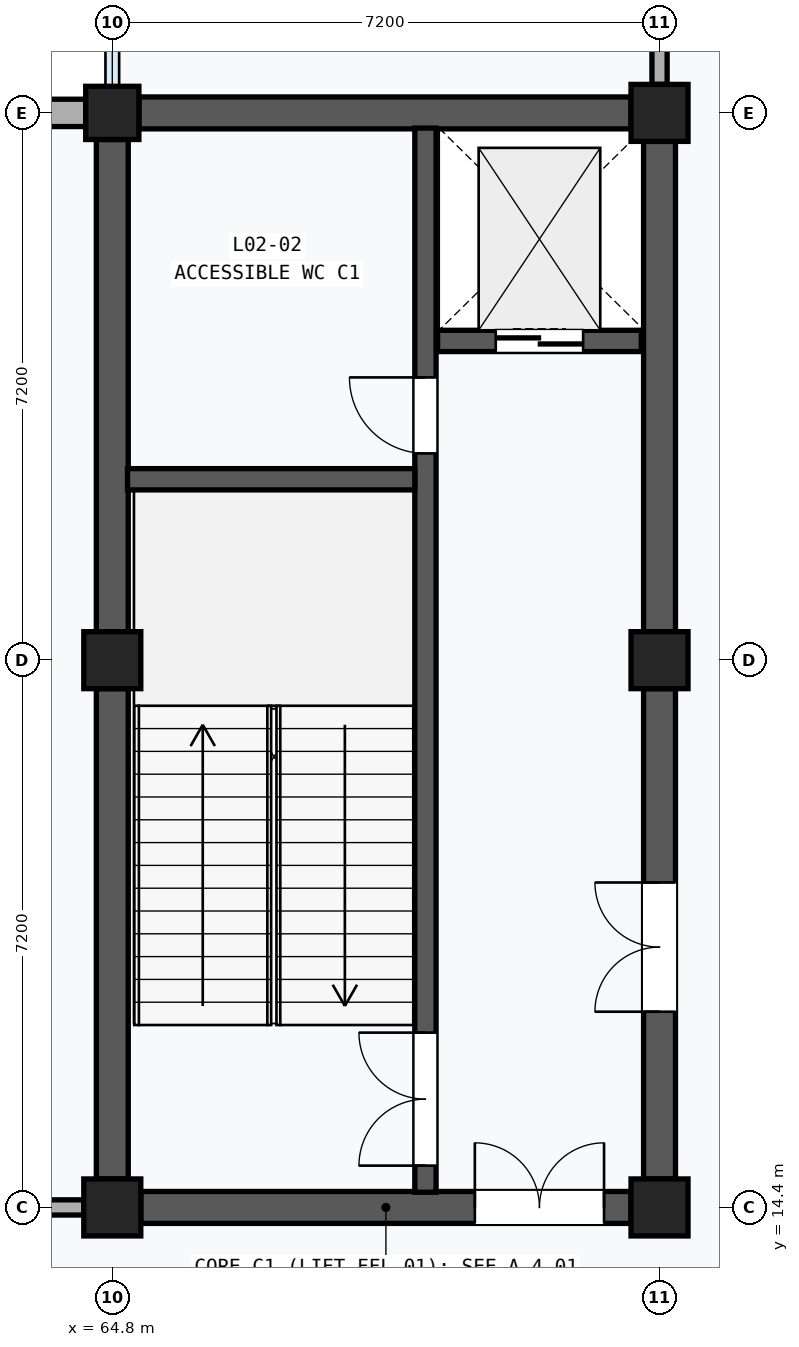
"""IFC4 building model, lengths in metres.
Left out: names, types, materials, properties, quantities, classifications, styles, units other than length and angle.
Written with IfcOpenShell. Run it as: python <this file> out.ifc"""

import sys

from ifc_helpers import new_model, si_unit, direction, frame, frame_2d, origin, origin_2d, place, context, subcontext, project, spatial, rectangle, extrude, element, fill, save


model = new_model("IFC4")
c1 = context("Model", 3, precision=1e-05, world=origin(), true_north=direction((0.0, 1.0)))
c2 = subcontext(c1, "Body", "Model", "MODEL_VIEW")
j1 = project(units=[si_unit("LENGTHUNIT", "METRE"), si_unit("PLANEANGLEUNIT", "RADIAN")], contexts=[c1])
p1 = place(None, origin())
s1 = spatial("IfcSite", under=j1, at=p1, CompositionType="ELEMENT")
p2 = place(p1, origin())
s2 = spatial("IfcBuilding", under=s1, at=p2, CompositionType="ELEMENT")
p3 = place(p2, frame((0.0, 0.0, 9.6)))
s3 = spatial("IfcBuildingStorey", under=s2, at=p3, CompositionType="ELEMENT", Elevation=9.6)
for number, where, z_axis, x_axis in (
    (1, (64.8, 14.4, 0.0), (0.0, 0.0, 1.0), (1.0, 0.0, 0.0)),
    (2, (64.8, 21.6, 0.0), (0.0, 0.0, 1.0), (1.0, 0.0, 0.0)),
):
    element("IfcColumn", number, at=place(p3, frame(where, z_axis=z_axis, x_axis=x_axis)), inside=s3, PredefinedType="COLUMN", context=c2, shape_type="SweptSolid", body=[
        extrude(rectangle(XDim=0.75, YDim=0.75, at=origin_2d()), origin(), (0.0, 0.0, 1.0), 4.8),
    ])
p4 = place(p3, frame((64.8, 28.8, 0.0), z_axis=(0.0, 0.0, 1.0), x_axis=(1.0, 0.0, 0.0)))
e3 = element("IfcColumn", 3, at=p4, inside=s3, PredefinedType="COLUMN", context=c2, shape_type="SweptSolid", body=[
    extrude(rectangle(XDim=0.7, YDim=0.7, at=origin_2d()), origin(), (0.0, 0.0, 1.0), 4.8),
])
for number, where, z_axis, x_axis in (
    (4, (72.0, 14.4, 0.0), (0.0, 0.0, 1.0), (1.0, 0.0, 0.0)),
    (5, (72.0, 21.6, 0.0), (0.0, 0.0, 1.0), (1.0, 0.0, 0.0)),
    (6, (72.0, 28.8, 0.0), (0.0, 0.0, 1.0), (1.0, 0.0, 0.0)),
):
    element("IfcColumn", number, at=place(p3, frame(where, z_axis=z_axis, x_axis=x_axis)), inside=s3, PredefinedType="COLUMN", context=c2, shape_type="SweptSolid", body=[
        extrude(rectangle(XDim=0.75, YDim=0.75, at=origin_2d()), origin(), (0.0, 0.0, 1.0), 4.8),
    ])
p5 = place(p3, frame((57.95, 28.8, 0.0), z_axis=(0.0, 0.0, 1.0), x_axis=(1.0, 0.0, 0.0)))
e7 = element("IfcWall", 7, at=p5, inside=s3, PredefinedType="SOLIDWALL", context=c2, shape_type="SweptSolid", body=[
    extrude(rectangle(XDim=6.5, YDim=0.36, at=frame_2d((3.25, 0.0))), origin(), (0.0, 0.0, 1.0), 3.88),
])
p6 = place(p5, frame((2.25, 0.0, 0.7)))
e8 = element("IfcOpeningElement", 8, at=p6, cuts=e7, PredefinedType="OPENING", context=c2, shape_type="SweptSolid", body=[
    extrude(rectangle(XDim=2.0, YDim=2.2, at=frame_2d((1.0, 1.1))), frame((0.0, 0.192, 0.0), z_axis=(0.0, -1.0, 0.0), x_axis=(1.0, 0.0, 0.0)), (0.0, 0.0, 1.0), 0.384),
])
p7 = place(p3, frame((64.8, 14.775, 0.0), z_axis=(0.0, 0.0, 1.0), x_axis=(0.0, 1.0, 0.0)))
e9 = element("IfcWall", 9, at=p7, inside=s3, PredefinedType="SHEAR", context=c2, shape_type="SweptSolid", body=[
    extrude(rectangle(XDim=6.45, YDim=0.42, at=frame_2d((3.225, 0.0))), origin(), (0.0, 0.0, 1.0), 3.74),
])
p8 = place(p3, frame((64.8, 21.975, 0.0), z_axis=(0.0, 0.0, 1.0), x_axis=(0.0, 1.0, 0.0)))
e10 = element("IfcWall", 10, at=p8, inside=s3, PredefinedType="SHEAR", context=c2, shape_type="SweptSolid", body=[
    extrude(rectangle(XDim=6.475, YDim=0.42, at=frame_2d((3.237, 0.0))), origin(), (0.0, 0.0, 1.0), 3.74),
])
p9 = place(p3, frame((72.0, 14.775, 0.0), z_axis=(0.0, 0.0, 1.0), x_axis=(0.0, 1.0, 0.0)))
e11 = element("IfcWall", 11, at=p9, inside=s3, PredefinedType="SHEAR", context=c2, shape_type="SweptSolid", body=[
    extrude(rectangle(XDim=6.45, YDim=0.42, at=frame_2d((3.225, 0.0))), origin(), (0.0, 0.0, 1.0), 3.74),
])
p10 = place(p9, frame((2.2, 0.0, 0.0)))
e12 = element("IfcOpeningElement", 12, at=p10, cuts=e11, PredefinedType="OPENING", context=c2, shape_type="SweptSolid", body=[
    extrude(rectangle(XDim=1.7, YDim=2.25, at=frame_2d((0.85, 1.125))), frame((0.0, 0.222, 0.0), z_axis=(0.0, -1.0, 0.0), x_axis=(1.0, 0.0, 0.0)), (0.0, 0.0, 1.0), 0.444),
])
p11 = place(p3, frame((72.0, 21.975, 0.0), z_axis=(0.0, 0.0, 1.0), x_axis=(0.0, 1.0, 0.0)))
e13 = element("IfcWall", 13, at=p11, inside=s3, PredefinedType="SHEAR", context=c2, shape_type="SweptSolid", body=[
    extrude(rectangle(XDim=6.45, YDim=0.42, at=frame_2d((3.225, 0.0))), origin(), (0.0, 0.0, 1.0), 3.74),
])
p12 = place(p3, frame((65.175, 14.4, 0.0), z_axis=(0.0, 0.0, 1.0), x_axis=(1.0, 0.0, 0.0)))
e14 = element("IfcWall", 14, at=p12, inside=s3, PredefinedType="SHEAR", context=c2, shape_type="SweptSolid", body=[
    extrude(rectangle(XDim=6.45, YDim=0.42, at=frame_2d((3.225, 0.0))), origin(), (0.0, 0.0, 1.0), 3.74),
])
p13 = place(p12, frame((4.395, 0.0, 0.0)))
e15 = element("IfcOpeningElement", 15, at=p13, cuts=e14, PredefinedType="OPENING", context=c2, shape_type="SweptSolid", body=[
    extrude(rectangle(XDim=1.7, YDim=2.25, at=frame_2d((0.85, 1.125))), frame((0.0, 0.222, 0.0), z_axis=(0.0, -1.0, 0.0), x_axis=(1.0, 0.0, 0.0)), (0.0, 0.0, 1.0), 0.444),
])
p14 = place(p3, frame((65.15, 28.8, 0.0), z_axis=(0.0, 0.0, 1.0), x_axis=(1.0, 0.0, 0.0)))
e16 = element("IfcWall", 16, at=p14, inside=s3, PredefinedType="SHEAR", context=c2, shape_type="SweptSolid", body=[
    extrude(rectangle(XDim=6.475, YDim=0.42, at=frame_2d((3.238, 0.0))), origin(), (0.0, 0.0, 1.0), 3.74),
])
p15 = place(p3, frame((68.92, 14.6, 0.0), z_axis=(0.0, 0.0, 1.0), x_axis=(0.0, 1.0, 0.0)))
e17 = element("IfcWall", 17, at=p15, inside=s3, PredefinedType="SHEAR", context=c2, shape_type="SweptSolid", body=[
    extrude(rectangle(XDim=14.0, YDim=0.28, at=frame_2d((7.0, 0.0))), origin(), (0.0, 0.0, 1.0), 4.51),
])
p16 = place(p15, frame((0.35, 0.0, 0.0)))
e18 = element("IfcOpeningElement", 18, at=p16, cuts=e17, PredefinedType="OPENING", context=c2, shape_type="SweptSolid", body=[
    extrude(rectangle(XDim=1.75, YDim=2.15, at=frame_2d((0.875, 1.075))), frame((0.0, 0.152, 0.0), z_axis=(0.0, -1.0, 0.0), x_axis=(1.0, 0.0, 0.0)), (0.0, 0.0, 1.0), 0.304),
])
p17 = place(p15, frame((9.72, 0.0, 0.0)))
e19 = element("IfcOpeningElement", 19, at=p17, cuts=e17, PredefinedType="OPENING", context=c2, shape_type="SweptSolid", body=[
    extrude(rectangle(XDim=1.0, YDim=2.15, at=frame_2d((0.5, 1.075))), frame((0.0, 0.152, 0.0), z_axis=(0.0, -1.0, 0.0), x_axis=(1.0, 0.0, 0.0)), (0.0, 0.0, 1.0), 0.304),
])
p18 = place(p3, frame((65.0, 23.98, 0.0), z_axis=(0.0, 0.0, 1.0), x_axis=(1.0, 0.0, 0.0)))
e20 = element("IfcWall", 20, at=p18, inside=s3, PredefinedType="SHEAR", context=c2, shape_type="SweptSolid", body=[
    extrude(rectangle(XDim=3.78, YDim=0.28, at=frame_2d((1.89, 0.0))), origin(), (0.0, 0.0, 1.0), 4.51),
])
p19 = place(p3, frame((69.08, 25.8, 0.0), z_axis=(0.0, 0.0, 1.0), x_axis=(1.0, 0.0, 0.0)))
e21 = element("IfcWall", 21, at=p19, inside=s3, PredefinedType="SHEAR", context=c2, shape_type="SweptSolid", body=[
    extrude(rectangle(XDim=2.68, YDim=0.28, at=frame_2d((1.34, 0.0))), origin(), (0.0, 0.0, 1.0), 4.51),
])
p20 = place(p19, frame((0.765, 0.0, 0.0)))
e22 = element("IfcOpeningElement", 22, at=p20, cuts=e21, PredefinedType="OPENING", context=c2, shape_type="SweptSolid", body=[
    extrude(rectangle(XDim=1.15, YDim=2.2, at=frame_2d((0.575, 1.1))), frame((0.0, 0.152, 0.0), z_axis=(0.0, -1.0, 0.0), x_axis=(1.0, 0.0, 0.0)), (0.0, 0.0, 1.0), 0.304),
])
p21 = place(p3, frame((57.975, 14.4, 0.0), z_axis=(0.0, 0.0, 1.0), x_axis=(1.0, 0.0, 0.0)))
e23 = element("IfcWall", 23, at=p21, inside=s3, PredefinedType="PARTITIONING", context=c2, shape_type="SweptSolid", body=[
    extrude(rectangle(XDim=6.45, YDim=0.2, at=frame_2d((3.225, 0.0))), origin(), (0.0, 0.0, 1.0), 3.74),
])
p22 = place(p21, frame((2.705, 0.0, 0.0)))
e24 = element("IfcOpeningElement", 24, at=p22, cuts=e23, PredefinedType="OPENING", context=c2, shape_type="SweptSolid", body=[
    extrude(rectangle(XDim=1.04, YDim=2.14, at=frame_2d((0.52, 1.07))), frame((0.0, 0.112, 0.0), z_axis=(0.0, -1.0, 0.0), x_axis=(1.0, 0.0, 0.0)), (0.0, 0.0, 1.0), 0.224),
])
p23 = place(p3, frame((72.0, 29.175, 0.0), z_axis=(0.0, 0.0, 1.0), x_axis=(0.0, 1.0, 0.0)))
e25 = element("IfcWall", 25, at=p23, inside=s3, PredefinedType="PARTITIONING", context=c2, shape_type="SweptSolid", body=[
    extrude(rectangle(XDim=6.45, YDim=0.2, at=frame_2d((3.225, 0.0))), origin(), (0.0, 0.0, 1.0), 3.74),
])
p24 = place(p23, frame((2.715, 0.0, 0.0)))
e26 = element("IfcOpeningElement", 26, at=p24, cuts=e25, PredefinedType="OPENING", context=c2, shape_type="SweptSolid", body=[
    extrude(rectangle(XDim=1.02, YDim=2.12, at=frame_2d((0.51, 1.06))), frame((0.0, 0.112, 0.0), z_axis=(0.0, -1.0, 0.0), x_axis=(1.0, 0.0, 0.0)), (0.0, 0.0, 1.0), 0.224),
])
p25 = place(p10, origin())
e27 = element("IfcDoor", 27, at=p25, inside=s3, OperationType="DOUBLE_DOOR_SINGLE_SWING", PredefinedType="DOOR", context=c2, shape_type="SweptSolid", body=[
    extrude(rectangle(XDim=1.7, YDim=2.25, at=frame_2d((0.85, 1.125))), frame((0.0, 0.025, 0.0), z_axis=(0.0, -1.0, 0.0), x_axis=(1.0, 0.0, 0.0)), (0.0, 0.0, 1.0), 0.05),
])
fill(e12, e27)
p26 = place(p13, origin())
e28 = element("IfcDoor", 28, at=p26, inside=s3, OperationType="DOUBLE_DOOR_SINGLE_SWING", PredefinedType="DOOR", context=c2, shape_type="SweptSolid", body=[
    extrude(rectangle(XDim=1.7, YDim=2.25, at=frame_2d((0.85, 1.125))), frame((0.0, 0.025, 0.0), z_axis=(0.0, -1.0, 0.0), x_axis=(1.0, 0.0, 0.0)), (0.0, 0.0, 1.0), 0.05),
])
fill(e15, e28)
p27 = place(p16, origin())
e29 = element("IfcDoor", 29, at=p27, inside=s3, OperationType="DOUBLE_DOOR_SINGLE_SWING", PredefinedType="DOOR", context=c2, shape_type="SweptSolid", body=[
    extrude(rectangle(XDim=1.75, YDim=2.15, at=frame_2d((0.875, 1.075))), frame((0.0, 0.025, 0.0), z_axis=(0.0, -1.0, 0.0), x_axis=(1.0, 0.0, 0.0)), (0.0, 0.0, 1.0), 0.05),
])
fill(e18, e29)
p28 = place(p17, origin())
e30 = element("IfcDoor", 30, at=p28, inside=s3, OperationType="SINGLE_SWING_RIGHT", PredefinedType="DOOR", context=c2, shape_type="SweptSolid", body=[
    extrude(rectangle(XDim=1.0, YDim=2.15, at=frame_2d((0.5, 1.075))), frame((0.0, 0.025, 0.0), z_axis=(0.0, -1.0, 0.0), x_axis=(1.0, 0.0, 0.0)), (0.0, 0.0, 1.0), 0.05),
])
fill(e19, e30)
p29 = place(p20, frame((1.15, 0.0, 0.0), z_axis=(0.0, 0.0, 1.0), x_axis=(-1.0, 0.0, 0.0)))
e31 = element("IfcDoor", 31, at=p29, inside=s3, OperationType="DOUBLE_DOOR_SLIDING", PredefinedType="DOOR", context=c2, shape_type="SweptSolid", body=[
    extrude(rectangle(XDim=1.15, YDim=2.2, at=frame_2d((0.575, 1.1))), frame((0.0, 0.025, 0.0), z_axis=(0.0, -1.0, 0.0), x_axis=(1.0, 0.0, 0.0)), (0.0, 0.0, 1.0), 0.05),
])
fill(e22, e31)
save(model, sys.argv[1])
